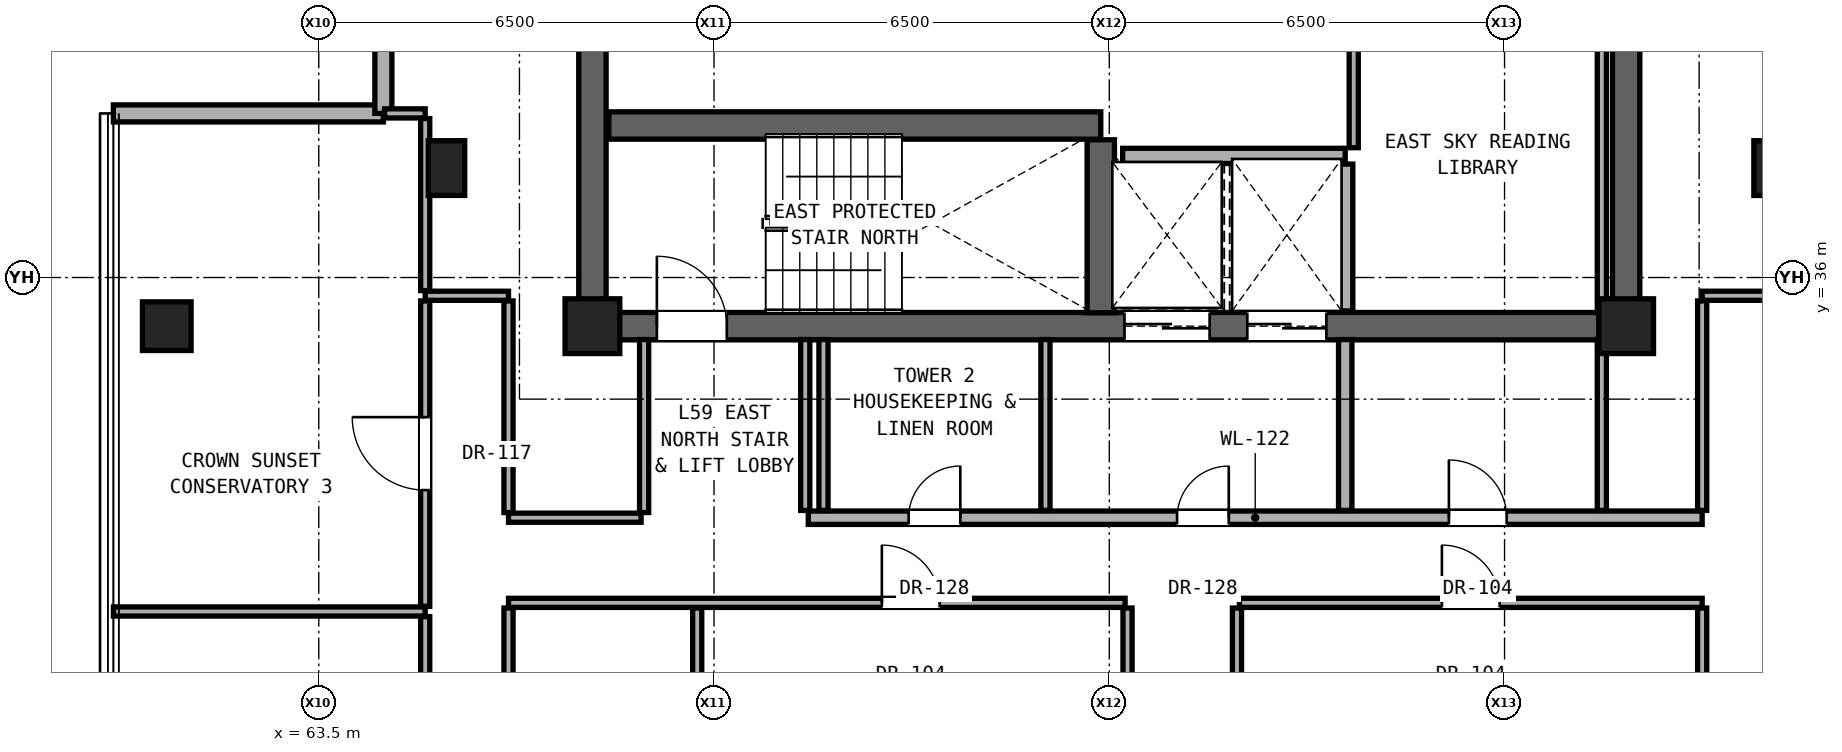
"""IFC4 building model, lengths in metres.
Left out: names, types, materials, properties, quantities, classifications, styles, units other than length and angle.
Written with IfcOpenShell. Run it as: python <this file> out.ifc"""

import sys

from ifc_helpers import new_model, si_unit, direction, frame, frame_2d, origin, origin_2d, place, context, subcontext, project, spatial, rectangle, hollow_rectangle, extrude, element, fill, save


model = new_model("IFC4")
c1 = context("Model", 3, precision=1e-05, world=origin(), true_north=direction((0.0, 1.0)))
c2 = subcontext(c1, "Body", "Model", "MODEL_VIEW")
j1 = project(units=[si_unit("LENGTHUNIT", "METRE"), si_unit("PLANEANGLEUNIT", "RADIAN")], contexts=[c1])
p1 = place(None, origin())
s1 = spatial("IfcSite", under=j1, at=p1, CompositionType="ELEMENT")
p2 = place(p1, origin())
s2 = spatial("IfcBuilding", under=s1, at=p2, CompositionType="ELEMENT")
p3 = place(p2, frame((0.0, 0.0, 206.4)))
s3 = spatial("IfcBuildingStorey", under=s2, at=p3, CompositionType="ELEMENT", Elevation=206.4)
for number, where, z_axis, x_axis in (
    (1, (68.0, 35.2, 0.0), (0.0, 0.0, 1.0), (1.0, 0.0, 0.0)),
    (2, (85.0, 35.2, 0.0), (0.0, 0.0, 1.0), (1.0, 0.0, 0.0)),
):
    element("IfcColumn", number, at=place(p3, frame(where, z_axis=z_axis, x_axis=x_axis)), inside=s3, PredefinedType="COLUMN", context=c2, shape_type="SweptSolid", body=[
        extrude(rectangle(XDim=0.9, YDim=0.9, at=origin_2d()), origin(), (0.0, 0.0, 1.0), 3.25),
    ])
p4 = place(p3, frame((61.0, 35.2, 0.0), z_axis=(0.0, 0.0, 1.0), x_axis=(1.0, 0.0, 0.0)))
e3 = element("IfcColumn", 3, at=p4, inside=s3, PredefinedType="COLUMN", context=c2, shape_type="SweptSolid", body=[
    extrude(hollow_rectangle(XDim=0.8, YDim=0.8, WallThickness=0.045, at=origin_2d()), origin(), (0.0, 0.0, 1.0), 3.25),
])
for number, where, z_axis, x_axis in (
    (4, (65.6, 37.8, 0.0), (0.0, 0.0, 1.0), (1.0, 0.0, 0.0)),
    (5, (87.4, 37.8, 0.0), (0.0, 0.0, 1.0), (1.0, 0.0, 0.0)),
):
    element("IfcColumn", number, at=place(p3, frame(where, z_axis=z_axis, x_axis=x_axis)), inside=s3, PredefinedType="PILASTER", context=c2, shape_type="SweptSolid", body=[
        extrude(rectangle(XDim=0.6, YDim=0.9, at=origin_2d()), origin(), (0.0, 0.0, 1.0), 3.25),
    ])
for number, where, z_axis, x_axis in (
    (6, (68.0, 35.2, 0.0), (0.0, 0.0, 1.0), (0.0, 1.0, 0.0)),
    (7, (85.0, 35.2, 0.0), (0.0, 0.0, 1.0), (0.0, 1.0, 0.0)),
):
    element("IfcWall", number, at=place(p3, frame(where, z_axis=z_axis, x_axis=x_axis)), inside=s3, PredefinedType="SHEAR", context=c2, shape_type="SweptSolid", body=[
        extrude(rectangle(XDim=5.6, YDim=0.45, at=frame_2d((2.8, 0.0))), origin(), (0.0, 0.0, 1.0), 2.6),
    ])
p5 = place(p3, frame((68.0, 35.2, 0.0), z_axis=(0.0, 0.0, 1.0), x_axis=(1.0, 0.0, 0.0)))
e8 = element("IfcWall", 8, at=p5, inside=s3, PredefinedType="SHEAR", context=c2, shape_type="SweptSolid", body=[
    extrude(rectangle(XDim=17.0, YDim=0.45, at=frame_2d((8.5, 0.0))), origin(), (0.0, 0.0, 1.0), 2.6),
])
p6 = place(p5, frame((1.06, 0.0, 0.0)))
e9 = element("IfcOpeningElement", 9, at=p6, cuts=e8, PredefinedType="OPENING", context=c2, shape_type="SweptSolid", body=[
    extrude(rectangle(XDim=1.15, YDim=2.2, at=frame_2d((0.575, 1.1))), frame((0.0, 0.235, 0.0), z_axis=(0.0, -1.0, 0.0), x_axis=(1.0, 0.0, 0.0)), (0.0, 0.0, 1.0), 0.47),
])
p7 = place(p5, frame((8.75, 0.0, 0.0)))
e10 = element("IfcOpeningElement", 10, at=p7, cuts=e8, PredefinedType="OPENING", context=c2, shape_type="SweptSolid", body=[
    extrude(rectangle(XDim=1.4, YDim=2.35, at=frame_2d((0.7, 1.175))), frame((0.0, 0.235, 0.0), z_axis=(0.0, -1.0, 0.0), x_axis=(1.0, 0.0, 0.0)), (0.0, 0.0, 1.0), 0.47),
])
p8 = place(p5, frame((10.77, 0.0, 0.0)))
e11 = element("IfcOpeningElement", 11, at=p8, cuts=e8, PredefinedType="OPENING", context=c2, shape_type="SweptSolid", body=[
    extrude(rectangle(XDim=1.3, YDim=2.3, at=frame_2d((0.65, 1.15))), frame((0.0, 0.235, 0.0), z_axis=(0.0, -1.0, 0.0), x_axis=(1.0, 0.0, 0.0)), (0.0, 0.0, 1.0), 0.47),
])
for number, where, z_axis, x_axis in (
    (12, (64.562, 38.699, 0.0), (0.0, 0.0, 1.0), (-1.0, 0.0, 0.0)),
    (13, (64.562, 43.138, 0.0), (0.0, 0.0, 1.0), (0.0, -1.0, 0.0)),
):
    element("IfcWall", number, at=place(p3, frame(where, z_axis=z_axis, x_axis=x_axis)), inside=s3, PredefinedType="SOLIDWALL", context=c2, shape_type="SweptSolid", body=[
        extrude(rectangle(XDim=4.44, YDim=0.28, at=frame_2d((2.22, 0.0))), origin(), (0.0, 0.0, 1.0), 2.58),
    ])
p9 = place(p3, frame((60.123, 30.508, 0.0), z_axis=(0.0, 0.0, 1.0), x_axis=(1.0, 0.0, 0.0)))
e14 = element("IfcWall", 14, at=p9, inside=s3, PredefinedType="PARTITIONING", context=c2, shape_type="SweptSolid", body=[
    extrude(rectangle(XDim=5.127, YDim=0.15, at=frame_2d((2.563, 0.0))), origin(), (0.0, 0.0, 1.0), 2.262),
])
p10 = place(p3, frame((66.62, 30.65, 0.0), z_axis=(0.0, 0.0, 1.0), x_axis=(1.0, 0.0, 0.0)))
e15 = element("IfcWall", 15, at=p10, inside=s3, PredefinedType="PARTITIONING", context=c2, shape_type="SweptSolid", body=[
    extrude(rectangle(XDim=10.14, YDim=0.15, at=frame_2d((5.07, 0.0))), origin(), (0.0, 0.0, 1.0), 2.175),
])
p11 = place(p10, frame((6.14, 0.0, 0.0)))
e16 = element("IfcOpeningElement", 16, at=p11, cuts=e15, PredefinedType="OPENING", context=c2, shape_type="SweptSolid", body=[
    extrude(rectangle(XDim=0.95, YDim=2.15, at=frame_2d((0.475, 1.075))), frame((0.0, 0.085, 0.0), z_axis=(0.0, -1.0, 0.0), x_axis=(1.0, 0.0, 0.0)), (0.0, 0.0, 1.0), 0.17),
])
p12 = place(p3, frame((78.64, 30.65, 0.0), z_axis=(0.0, 0.0, 1.0), x_axis=(1.0, 0.0, 0.0)))
e17 = element("IfcWall", 17, at=p12, inside=s3, PredefinedType="PARTITIONING", context=c2, shape_type="SweptSolid", body=[
    extrude(rectangle(XDim=7.61, YDim=0.15, at=frame_2d((3.805, 0.0))), origin(), (0.0, 0.0, 1.0), 2.175),
])
p13 = place(p12, frame((3.33, 0.0, 0.0)))
e18 = element("IfcOpeningElement", 18, at=p13, cuts=e17, PredefinedType="OPENING", context=c2, shape_type="SweptSolid", body=[
    extrude(rectangle(XDim=0.95, YDim=2.15, at=frame_2d((0.475, 1.075))), frame((0.0, 0.085, 0.0), z_axis=(0.0, -1.0, 0.0), x_axis=(1.0, 0.0, 0.0)), (0.0, 0.0, 1.0), 0.17),
])
p14 = place(p3, frame((66.62, 32.05, 0.0), z_axis=(0.0, 0.0, 1.0), x_axis=(1.0, 0.0, 0.0)))
e19 = element("IfcWall", 19, at=p14, inside=s3, PredefinedType="PARTITIONING", context=c2, shape_type="SweptSolid", body=[
    extrude(rectangle(XDim=2.18, YDim=0.15, at=frame_2d((1.09, 0.0))), origin(), (0.0, 0.0, 1.0), 2.262),
])
p15 = place(p3, frame((71.55, 32.05, 0.0), z_axis=(0.0, 0.0, 1.0), x_axis=(1.0, 0.0, 0.0)))
e20 = element("IfcWall", 20, at=p15, inside=s3, PredefinedType="SOLIDWALL", context=c2, shape_type="SweptSolid", body=[
    extrude(rectangle(XDim=14.7, YDim=0.22, at=frame_2d((7.35, 0.0))), origin(), (0.0, 0.0, 1.0), 2.175),
])
p16 = place(p15, frame((6.065, 0.0, 0.0)))
e21 = element("IfcOpeningElement", 21, at=p16, cuts=e20, PredefinedType="OPENING", context=c2, shape_type="SweptSolid", body=[
    extrude(rectangle(XDim=0.85, YDim=2.01, at=frame_2d((0.425, 1.005))), frame((0.0, 0.12, 0.0), z_axis=(0.0, -1.0, 0.0), x_axis=(1.0, 0.0, 0.0)), (0.0, 0.0, 1.0), 0.24),
])
p17 = place(p15, frame((10.535, 0.0, 0.0)))
e22 = element("IfcOpeningElement", 22, at=p17, cuts=e20, PredefinedType="OPENING", context=c2, shape_type="SweptSolid", body=[
    extrude(rectangle(XDim=0.95, YDim=2.15, at=frame_2d((0.475, 1.075))), frame((0.0, 0.12, 0.0), z_axis=(0.0, -1.0, 0.0), x_axis=(1.0, 0.0, 0.0)), (0.0, 0.0, 1.0), 0.24),
])
p18 = place(p15, frame((1.65, 0.0, 0.0)))
e23 = element("IfcOpeningElement", 23, at=p18, cuts=e20, PredefinedType="OPENING", context=c2, shape_type="SweptSolid", body=[
    extrude(rectangle(XDim=0.85, YDim=2.01, at=frame_2d((0.425, 1.005))), frame((0.0, 0.12, 0.0), z_axis=(0.0, -1.0, 0.0), x_axis=(1.0, 0.0, 0.0)), (0.0, 0.0, 1.0), 0.24),
])
p19 = place(p3, frame((65.25, 35.7, 0.0), z_axis=(0.0, 0.0, 1.0), x_axis=(1.0, 0.0, 0.0)))
e24 = element("IfcWall", 24, at=p19, inside=s3, PredefinedType="PARTITIONING", context=c2, shape_type="SweptSolid", body=[
    extrude(rectangle(XDim=1.37, YDim=0.15, at=frame_2d((0.685, 0.0))), origin(), (0.0, 0.0, 1.0), 2.6),
])
p20 = place(p3, frame((86.25, 35.7, 0.0), z_axis=(0.0, 0.0, 1.0), x_axis=(1.0, 0.0, 0.0)))
e25 = element("IfcWall", 25, at=p20, inside=s3, PredefinedType="PARTITIONING", context=c2, shape_type="SweptSolid", body=[
    extrude(rectangle(XDim=1.35, YDim=0.15, at=frame_2d((0.675, 0.0))), origin(), (0.0, 0.0, 1.0), 2.6),
])
p21 = place(p3, frame((76.72, 38.0, 0.0), z_axis=(0.0, 0.0, 1.0), x_axis=(1.0, 0.0, 0.0)))
e26 = element("IfcWall", 26, at=p21, inside=s3, PredefinedType="SOLIDWALL", context=c2, shape_type="SweptSolid", body=[
    extrude(rectangle(XDim=3.66, YDim=0.25, at=frame_2d((1.83, 0.0))), origin(), (0.0, 0.0, 1.0), 2.6),
])
p22 = place(p3, frame((68.27, 38.5, 0.0), z_axis=(0.0, 0.0, 1.0), x_axis=(1.0, 0.0, 0.0)))
e27 = element("IfcWall", 27, at=p22, inside=s3, PredefinedType="SHEAR", context=c2, shape_type="SweptSolid", body=[
    extrude(rectangle(XDim=8.09, YDim=0.45, at=frame_2d((4.045, 0.0))), origin(), (0.0, 0.0, 1.0), 2.6),
])
p23 = place(p3, frame((64.582, 38.699, 0.0), z_axis=(0.0, 0.0, 1.0), x_axis=(1.0, 0.0, 0.0)))
e28 = element("IfcWall", 28, at=p23, inside=s3, PredefinedType="PARTITIONING", context=c2, shape_type="SweptSolid", body=[
    extrude(rectangle(XDim=0.668, YDim=0.15, at=frame_2d((0.334, 0.0))), origin(), (0.0, 0.0, 1.0), 2.6),
])
p24 = place(p3, frame((65.25, 25.919, 0.0), z_axis=(0.0, 0.0, 1.0), x_axis=(0.0, 1.0, 0.0)))
e29 = element("IfcWall", 29, at=p24, inside=s3, PredefinedType="PARTITIONING", context=c2, shape_type="SweptSolid", body=[
    extrude(rectangle(XDim=4.504, YDim=0.15, at=frame_2d((2.252, 0.0))), origin(), (0.0, 0.0, 1.0), 2.262),
])
p25 = place(p24, frame((1.652, 0.0, 0.0)))
e30 = element("IfcOpeningElement", 30, at=p25, cuts=e29, PredefinedType="OPENING", context=c2, shape_type="SweptSolid", body=[
    extrude(rectangle(XDim=1.2, YDim=2.25, at=frame_2d((0.6, 1.125))), frame((0.0, 0.085, 0.0), z_axis=(0.0, -1.0, 0.0), x_axis=(1.0, 0.0, 0.0)), (0.0, 0.0, 1.0), 0.17),
])
p26 = place(p3, frame((65.25, 30.593, 0.0), z_axis=(0.0, 0.0, 1.0), x_axis=(0.0, 1.0, 0.0)))
e31 = element("IfcWall", 31, at=p26, inside=s3, PredefinedType="PARTITIONING", context=c2, shape_type="SweptSolid", body=[
    extrude(rectangle(XDim=5.022, YDim=0.15, at=frame_2d((2.511, 0.0))), origin(), (0.0, 0.0, 1.0), 2.262),
])
p27 = place(p26, frame((1.911, 0.0, 0.0)))
e32 = element("IfcOpeningElement", 32, at=p27, cuts=e31, PredefinedType="OPENING", context=c2, shape_type="SweptSolid", body=[
    extrude(rectangle(XDim=1.2, YDim=2.25, at=frame_2d((0.6, 1.125))), frame((0.0, 0.085, 0.0), z_axis=(0.0, -1.0, 0.0), x_axis=(1.0, 0.0, 0.0)), (0.0, 0.0, 1.0), 0.17),
])
p28 = place(p3, frame((65.25, 35.785, 0.0), z_axis=(0.0, 0.0, 1.0), x_axis=(0.0, 1.0, 0.0)))
e33 = element("IfcWall", 33, at=p28, inside=s3, PredefinedType="PARTITIONING", context=c2, shape_type="SweptSolid", body=[
    extrude(rectangle(XDim=2.829, YDim=0.15, at=frame_2d((1.415, 0.0))), origin(), (0.0, 0.0, 1.0), 2.043),
])
p29 = place(p3, frame((66.62, 24.935, 0.0), z_axis=(0.0, 0.0, 1.0), x_axis=(0.0, 1.0, 0.0)))
e34 = element("IfcWall", 34, at=p29, inside=s3, PredefinedType="PARTITIONING", context=c2, shape_type="SweptSolid", body=[
    extrude(rectangle(XDim=5.63, YDim=0.15, at=frame_2d((2.815, 0.0))), origin(), (0.0, 0.0, 1.0), 2.262),
])
p30 = place(p29, frame((2.34, 0.0, 0.0)))
e35 = element("IfcOpeningElement", 35, at=p30, cuts=e34, PredefinedType="OPENING", context=c2, shape_type="SweptSolid", body=[
    extrude(rectangle(XDim=0.95, YDim=2.15, at=frame_2d((0.475, 1.075))), frame((0.0, 0.085, 0.0), z_axis=(0.0, -1.0, 0.0), x_axis=(1.0, 0.0, 0.0)), (0.0, 0.0, 1.0), 0.17),
])
p31 = place(p3, frame((66.62, 32.135, 0.0), z_axis=(0.0, 0.0, 1.0), x_axis=(0.0, 1.0, 0.0)))
e36 = element("IfcWall", 36, at=p31, inside=s3, PredefinedType="PARTITIONING", context=c2, shape_type="SweptSolid", body=[
    extrude(rectangle(XDim=3.48, YDim=0.15, at=frame_2d((1.74, 0.0))), origin(), (0.0, 0.0, 1.0), 2.262),
])
p32 = place(p3, frame((68.85, 32.135, 0.0), z_axis=(0.0, 0.0, 1.0), x_axis=(0.0, 1.0, 0.0)))
e37 = element("IfcWall", 37, at=p32, inside=s3, PredefinedType="PARTITIONING", context=c2, shape_type="SweptSolid", body=[
    extrude(rectangle(XDim=2.845, YDim=0.15, at=frame_2d((1.422, 0.0))), origin(), (0.0, 0.0, 1.0), 2.6),
])
p33 = place(p3, frame((69.723, 24.935, 0.0), z_axis=(0.0, 0.0, 1.0), x_axis=(0.0, 1.0, 0.0)))
e38 = element("IfcWall", 38, at=p33, inside=s3, PredefinedType="PARTITIONING", context=c2, shape_type="SweptSolid", body=[
    extrude(rectangle(XDim=5.63, YDim=0.15, at=frame_2d((2.815, 0.0))), origin(), (0.0, 0.0, 1.0), 2.262),
])
for number, where, z_axis, x_axis in (
    (39, (71.5, 32.17, 0.0), (0.0, 0.0, 1.0), (0.0, 1.0, 0.0)),
    (40, (71.8, 32.17, 0.0), (0.0, 0.0, 1.0), (0.0, 1.0, 0.0)),
    (41, (75.45, 32.17, 0.0), (0.0, 0.0, 1.0), (0.0, 1.0, 0.0)),
):
    element("IfcWall", number, at=place(p3, frame(where, z_axis=z_axis, x_axis=x_axis)), inside=s3, PredefinedType="PARTITIONING", context=c2, shape_type="SweptSolid", body=[
        extrude(rectangle(XDim=2.81, YDim=0.15, at=frame_2d((1.405, 0.0))), origin(), (0.0, 0.0, 1.0), 2.6),
    ])
p34 = place(p3, frame((76.36, 35.42, 0.0), z_axis=(0.0, 0.0, 1.0), x_axis=(0.0, 1.0, 0.0)))
e42 = element("IfcWall", 42, at=p34, inside=s3, PredefinedType="SHEAR", context=c2, shape_type="SweptSolid", body=[
    extrude(rectangle(XDim=2.845, YDim=0.45, at=frame_2d((1.422, 0.0))), origin(), (0.0, 0.0, 1.0), 2.6),
])
p35 = place(p3, frame((76.8, 22.435, 0.0), z_axis=(0.0, 0.0, 1.0), x_axis=(0.0, 1.0, 0.0)))
e43 = element("IfcWall", 43, at=p35, inside=s3, PredefinedType="PARTITIONING", context=c2, shape_type="SweptSolid", body=[
    extrude(rectangle(XDim=8.13, YDim=0.15, at=frame_2d((4.065, 0.0))), origin(), (0.0, 0.0, 1.0), 2.262),
])
p36 = place(p3, frame((78.6, 27.485, 0.0), z_axis=(0.0, 0.0, 1.0), x_axis=(0.0, 1.0, 0.0)))
e44 = element("IfcWall", 44, at=p36, inside=s3, PredefinedType="PARTITIONING", context=c2, shape_type="SweptSolid", body=[
    extrude(rectangle(XDim=3.08, YDim=0.15, at=frame_2d((1.54, 0.0))), origin(), (0.0, 0.0, 1.0), 2.262),
])
p37 = place(p3, frame((80.38, 32.17, 0.0), z_axis=(0.0, 0.0, 1.0), x_axis=(0.0, 1.0, 0.0)))
e45 = element("IfcWall", 45, at=p37, inside=s3, PredefinedType="SOLIDWALL", context=c2, shape_type="SweptSolid", body=[
    extrude(rectangle(XDim=2.81, YDim=0.22, at=frame_2d((1.405, 0.0))), origin(), (0.0, 0.0, 1.0), 2.6),
])
p38 = place(p3, frame((80.38, 35.45, 0.0), z_axis=(0.0, 0.0, 1.0), x_axis=(0.0, 1.0, 0.0)))
e46 = element("IfcWall", 46, at=p38, inside=s3, PredefinedType="SOLIDWALL", context=c2, shape_type="SweptSolid", body=[
    extrude(rectangle(XDim=2.415, YDim=0.25, at=frame_2d((1.208, 0.0))), origin(), (0.0, 0.0, 1.0), 2.6),
])
p39 = place(p3, frame((80.52, 38.135, 0.0), z_axis=(0.0, 0.0, 1.0), x_axis=(0.0, 1.0, 0.0)))
e47 = element("IfcWall", 47, at=p39, inside=s3, PredefinedType="PARTITIONING", context=c2, shape_type="SweptSolid", body=[
    extrude(rectangle(XDim=2.315, YDim=0.15, at=frame_2d((1.157, 0.0))), origin(), (0.0, 0.0, 1.0), 2.6),
])
p40 = place(p3, frame((84.6, 32.17, 0.0), z_axis=(0.0, 0.0, 1.0), x_axis=(0.0, 1.0, 0.0)))
e48 = element("IfcWall", 48, at=p40, inside=s3, PredefinedType="PARTITIONING", context=c2, shape_type="SweptSolid", body=[
    extrude(rectangle(XDim=2.81, YDim=0.15, at=frame_2d((1.405, 0.0))), origin(), (0.0, 0.0, 1.0), 2.6),
])
p41 = place(p3, frame((84.6, 35.42, 0.0), z_axis=(0.0, 0.0, 1.0), x_axis=(0.0, 1.0, 0.0)))
e49 = element("IfcWall", 49, at=p41, inside=s3, PredefinedType="PARTITIONING", context=c2, shape_type="SweptSolid", body=[
    extrude(rectangle(XDim=5.03, YDim=0.15, at=frame_2d((2.515, 0.0))), origin(), (0.0, 0.0, 1.0), 2.6),
])
p42 = place(p3, frame((86.25, 27.485, 0.0), z_axis=(0.0, 0.0, 1.0), x_axis=(0.0, 1.0, 0.0)))
e50 = element("IfcWall", 50, at=p42, inside=s3, PredefinedType="PARTITIONING", context=c2, shape_type="SweptSolid", body=[
    extrude(rectangle(XDim=3.08, YDim=0.15, at=frame_2d((1.54, 0.0))), origin(), (0.0, 0.0, 1.0), 2.262),
])
p43 = place(p3, frame((86.25, 32.17, 0.0), z_axis=(0.0, 0.0, 1.0), x_axis=(0.0, 1.0, 0.0)))
e51 = element("IfcWall", 51, at=p43, inside=s3, PredefinedType="PARTITIONING", context=c2, shape_type="SweptSolid", body=[
    extrude(rectangle(XDim=3.445, YDim=0.15, at=frame_2d((1.723, 0.0))), origin(), (0.0, 0.0, 1.0), 2.262),
])
p44 = place(p6, origin())
e52 = element("IfcDoor", 52, at=p44, inside=s3, OperationType="SINGLE_SWING_LEFT", PredefinedType="DOOR", context=c2, shape_type="SweptSolid", body=[
    extrude(rectangle(XDim=1.15, YDim=2.2, at=frame_2d((0.575, 1.1))), frame((0.0, 0.025, 0.0), z_axis=(0.0, -1.0, 0.0), x_axis=(1.0, 0.0, 0.0)), (0.0, 0.0, 1.0), 0.05),
])
fill(e9, e52)
p45 = place(p16, origin())
e53 = element("IfcDoor", 53, at=p45, inside=s3, OperationType="SINGLE_SWING_RIGHT", PredefinedType="DOOR", context=c2, shape_type="SweptSolid", body=[
    extrude(rectangle(XDim=0.85, YDim=2.01, at=frame_2d((0.425, 1.005))), frame((0.0, 0.025, 0.0), z_axis=(0.0, -1.0, 0.0), x_axis=(1.0, 0.0, 0.0)), (0.0, 0.0, 1.0), 0.05),
])
fill(e21, e53)
p46 = place(p17, origin())
e54 = element("IfcDoor", 54, at=p46, inside=s3, OperationType="SINGLE_SWING_LEFT", PredefinedType="DOOR", context=c2, shape_type="SweptSolid", body=[
    extrude(rectangle(XDim=0.95, YDim=2.15, at=frame_2d((0.475, 1.075))), frame((0.0, 0.025, 0.0), z_axis=(0.0, -1.0, 0.0), x_axis=(1.0, 0.0, 0.0)), (0.0, 0.0, 1.0), 0.05),
])
fill(e22, e54)
p47 = place(p18, origin())
e55 = element("IfcDoor", 55, at=p47, inside=s3, OperationType="SINGLE_SWING_RIGHT", PredefinedType="DOOR", context=c2, shape_type="SweptSolid", body=[
    extrude(rectangle(XDim=0.85, YDim=2.01, at=frame_2d((0.425, 1.005))), frame((0.0, 0.025, 0.0), z_axis=(0.0, -1.0, 0.0), x_axis=(1.0, 0.0, 0.0)), (0.0, 0.0, 1.0), 0.05),
])
fill(e23, e55)
p48 = place(p27, origin())
e56 = element("IfcDoor", 56, at=p48, inside=s3, OperationType="SINGLE_SWING_RIGHT", PredefinedType="DOOR", context=c2, shape_type="SweptSolid", body=[
    extrude(rectangle(XDim=1.2, YDim=2.25, at=frame_2d((0.6, 1.125))), frame((0.0, 0.025, 0.0), z_axis=(0.0, -1.0, 0.0), x_axis=(1.0, 0.0, 0.0)), (0.0, 0.0, 1.0), 0.05),
])
fill(e32, e56)
p49 = place(p11, origin())
e57 = element("IfcDoor", 57, at=p49, inside=s3, OperationType="SINGLE_SWING_LEFT", PredefinedType="DOOR", context=c2, shape_type="SweptSolid", body=[
    extrude(rectangle(XDim=0.95, YDim=2.15, at=frame_2d((0.475, 1.075))), frame((0.0, 0.025, 0.0), z_axis=(0.0, -1.0, 0.0), x_axis=(1.0, 0.0, 0.0)), (0.0, 0.0, 1.0), 0.05),
])
fill(e16, e57)
p50 = place(p13, origin())
e58 = element("IfcDoor", 58, at=p50, inside=s3, OperationType="SINGLE_SWING_LEFT", PredefinedType="DOOR", context=c2, shape_type="SweptSolid", body=[
    extrude(rectangle(XDim=0.95, YDim=2.15, at=frame_2d((0.475, 1.075))), frame((0.0, 0.025, 0.0), z_axis=(0.0, -1.0, 0.0), x_axis=(1.0, 0.0, 0.0)), (0.0, 0.0, 1.0), 0.05),
])
fill(e18, e58)
p51 = place(p7, origin())
e59 = element("IfcDoor", 59, at=p51, inside=s3, OperationType="DOUBLE_DOOR_SLIDING", PredefinedType="DOOR", context=c2, shape_type="SweptSolid", body=[
    extrude(rectangle(XDim=1.4, YDim=2.35, at=frame_2d((0.7, 1.175))), frame((0.0, 0.025, 0.0), z_axis=(0.0, -1.0, 0.0), x_axis=(1.0, 0.0, 0.0)), (0.0, 0.0, 1.0), 0.05),
])
fill(e10, e59)
p52 = place(p8, origin())
e60 = element("IfcDoor", 60, at=p52, inside=s3, OperationType="DOUBLE_DOOR_SLIDING", PredefinedType="DOOR", context=c2, shape_type="SweptSolid", body=[
    extrude(rectangle(XDim=1.3, YDim=2.3, at=frame_2d((0.65, 1.15))), frame((0.0, 0.025, 0.0), z_axis=(0.0, -1.0, 0.0), x_axis=(1.0, 0.0, 0.0)), (0.0, 0.0, 1.0), 0.05),
])
fill(e11, e60)
save(model, sys.argv[1])
